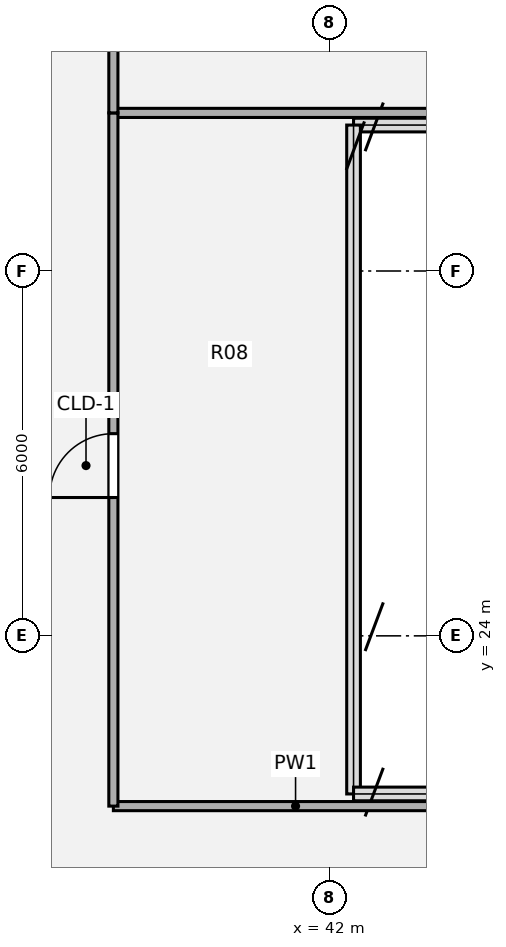
"""IFC4 building model, lengths in metres.
Left out: names, types, materials, properties, quantities, classifications, styles, units other than length and angle.
Written with IfcOpenShell. Run it as: python <this file> out.ifc"""

import sys

from ifc_helpers import new_model, si_unit, direction, frame, frame_2d, origin, origin_2d, place, context, subcontext, project, spatial, rectangle, extrude, source, transform, mapped, element, fill, save


model = new_model("IFC4")
c1 = context("Model", 3, precision=1e-05, world=origin(), true_north=direction((0.0, 1.0)))
c2 = subcontext(c1, "Body", "Model", "MODEL_VIEW")
j1 = project(units=[si_unit("LENGTHUNIT", "METRE"), si_unit("PLANEANGLEUNIT", "RADIAN")], contexts=[c1])
p1 = place(None, origin())
s1 = spatial("IfcSite", under=j1, at=p1, CompositionType="ELEMENT")
p2 = place(p1, origin())
s2 = spatial("IfcBuilding", under=s1, at=p2, CompositionType="ELEMENT")
p3 = place(p2, frame((0.0, 0.0, 190.44)))
s3 = spatial("IfcBuildingStorey", under=s2, at=p3, CompositionType="ELEMENT", Elevation=190.44)
p4 = place(p3, frame((38.45, 21.2, 0.0), z_axis=(0.0, 0.0, 1.0), x_axis=(1.0, 0.0, 0.0)))
e1 = element("IfcWall", 1, at=p4, inside=s3, PredefinedType="PARTITIONING", context=c2, shape_type="SweptSolid", body=[
    extrude(rectangle(XDim=5.993, YDim=0.15, at=frame_2d((2.996, 0.0))), origin(), (0.0, 0.0, 1.0), 3.5),
])
p5 = place(p3, frame((38.45, 32.6, 0.0), z_axis=(0.0, 0.0, 1.0), x_axis=(1.0, 0.0, 0.0)))
e2 = element("IfcWall", 2, at=p5, inside=s3, PredefinedType="PARTITIONING", context=c2, shape_type="SweptSolid", body=[
    extrude(rectangle(XDim=5.993, YDim=0.15, at=frame_2d((2.997, 0.0))), origin(), (0.0, 0.0, 1.0), 3.5),
])
p6 = place(p3, frame((38.45, 21.2, 0.0), z_axis=(0.0, 0.0, 1.0), x_axis=(0.0, 1.0, 0.0)))
e3 = element("IfcWall", 3, at=p6, inside=s3, PredefinedType="PARTITIONING", context=c2, shape_type="SweptSolid", body=[
    extrude(rectangle(XDim=11.4, YDim=0.15, at=frame_2d((5.7, 0.0))), origin(), (0.0, 0.0, 1.0), 3.5),
])
p7 = place(p6, frame((5.075, 0.0, 0.0)))
e4 = element("IfcOpeningElement", 4, at=p7, cuts=e3, PredefinedType="OPENING", context=c2, shape_type="SweptSolid", body=[
    extrude(rectangle(XDim=1.05, YDim=2.1, at=origin_2d()), frame((0.525, 0.085, 1.05), z_axis=(0.0, -1.0, 0.0), x_axis=(1.0, 0.0, 0.0)), (0.0, 0.0, 1.0), 0.17),
])
p8 = place(p3, frame((38.45, 32.6, 0.0), z_axis=(0.0, 0.0, 1.0), x_axis=(0.0, 1.0, 0.0)))
e5 = element("IfcWall", 5, at=p8, inside=s3, PredefinedType="PARTITIONING", context=c2, shape_type="SweptSolid", body=[
    extrude(rectangle(XDim=18.1, YDim=0.15, at=frame_2d((9.05, 0.0))), origin(), (0.0, 0.0, 1.0), 3.5),
])
p9 = place(p8, frame((8.525, 0.0, 0.0)))
e6 = element("IfcOpeningElement", 6, at=p9, cuts=e5, PredefinedType="OPENING", context=c2, shape_type="SweptSolid", body=[
    extrude(rectangle(XDim=1.05, YDim=2.1, at=origin_2d()), frame((0.525, 0.085, 1.05), z_axis=(0.0, -1.0, 0.0), x_axis=(1.0, 0.0, 0.0)), (0.0, 0.0, 1.0), 0.17),
])
m1 = source(origin(), c2, "Body", "SweptSolid", [
    extrude(rectangle(XDim=1.05, YDim=2.1, at=origin_2d()), frame((0.525, 0.025, 1.05), z_axis=(0.0, -1.0, 0.0), x_axis=(1.0, 0.0, 0.0)), (0.0, 0.0, 1.0), 0.05),
])
p10 = place(p7, origin())
e7 = element("IfcDoor", 7, at=p10, inside=s3, OperationType="SINGLE_SWING_LEFT", PredefinedType="DOOR", context=c2, shape_type="MappedRepresentation", body=[
    mapped(m1, transform((0.0, 0.0, 0.0), x_axis=(1.0, 0.0, 0.0), y_axis=(0.0, 1.0, 0.0), z_axis=(0.0, 0.0, 1.0), scale=1.0)),
])
fill(e4, e7)
save(model, sys.argv[1])
